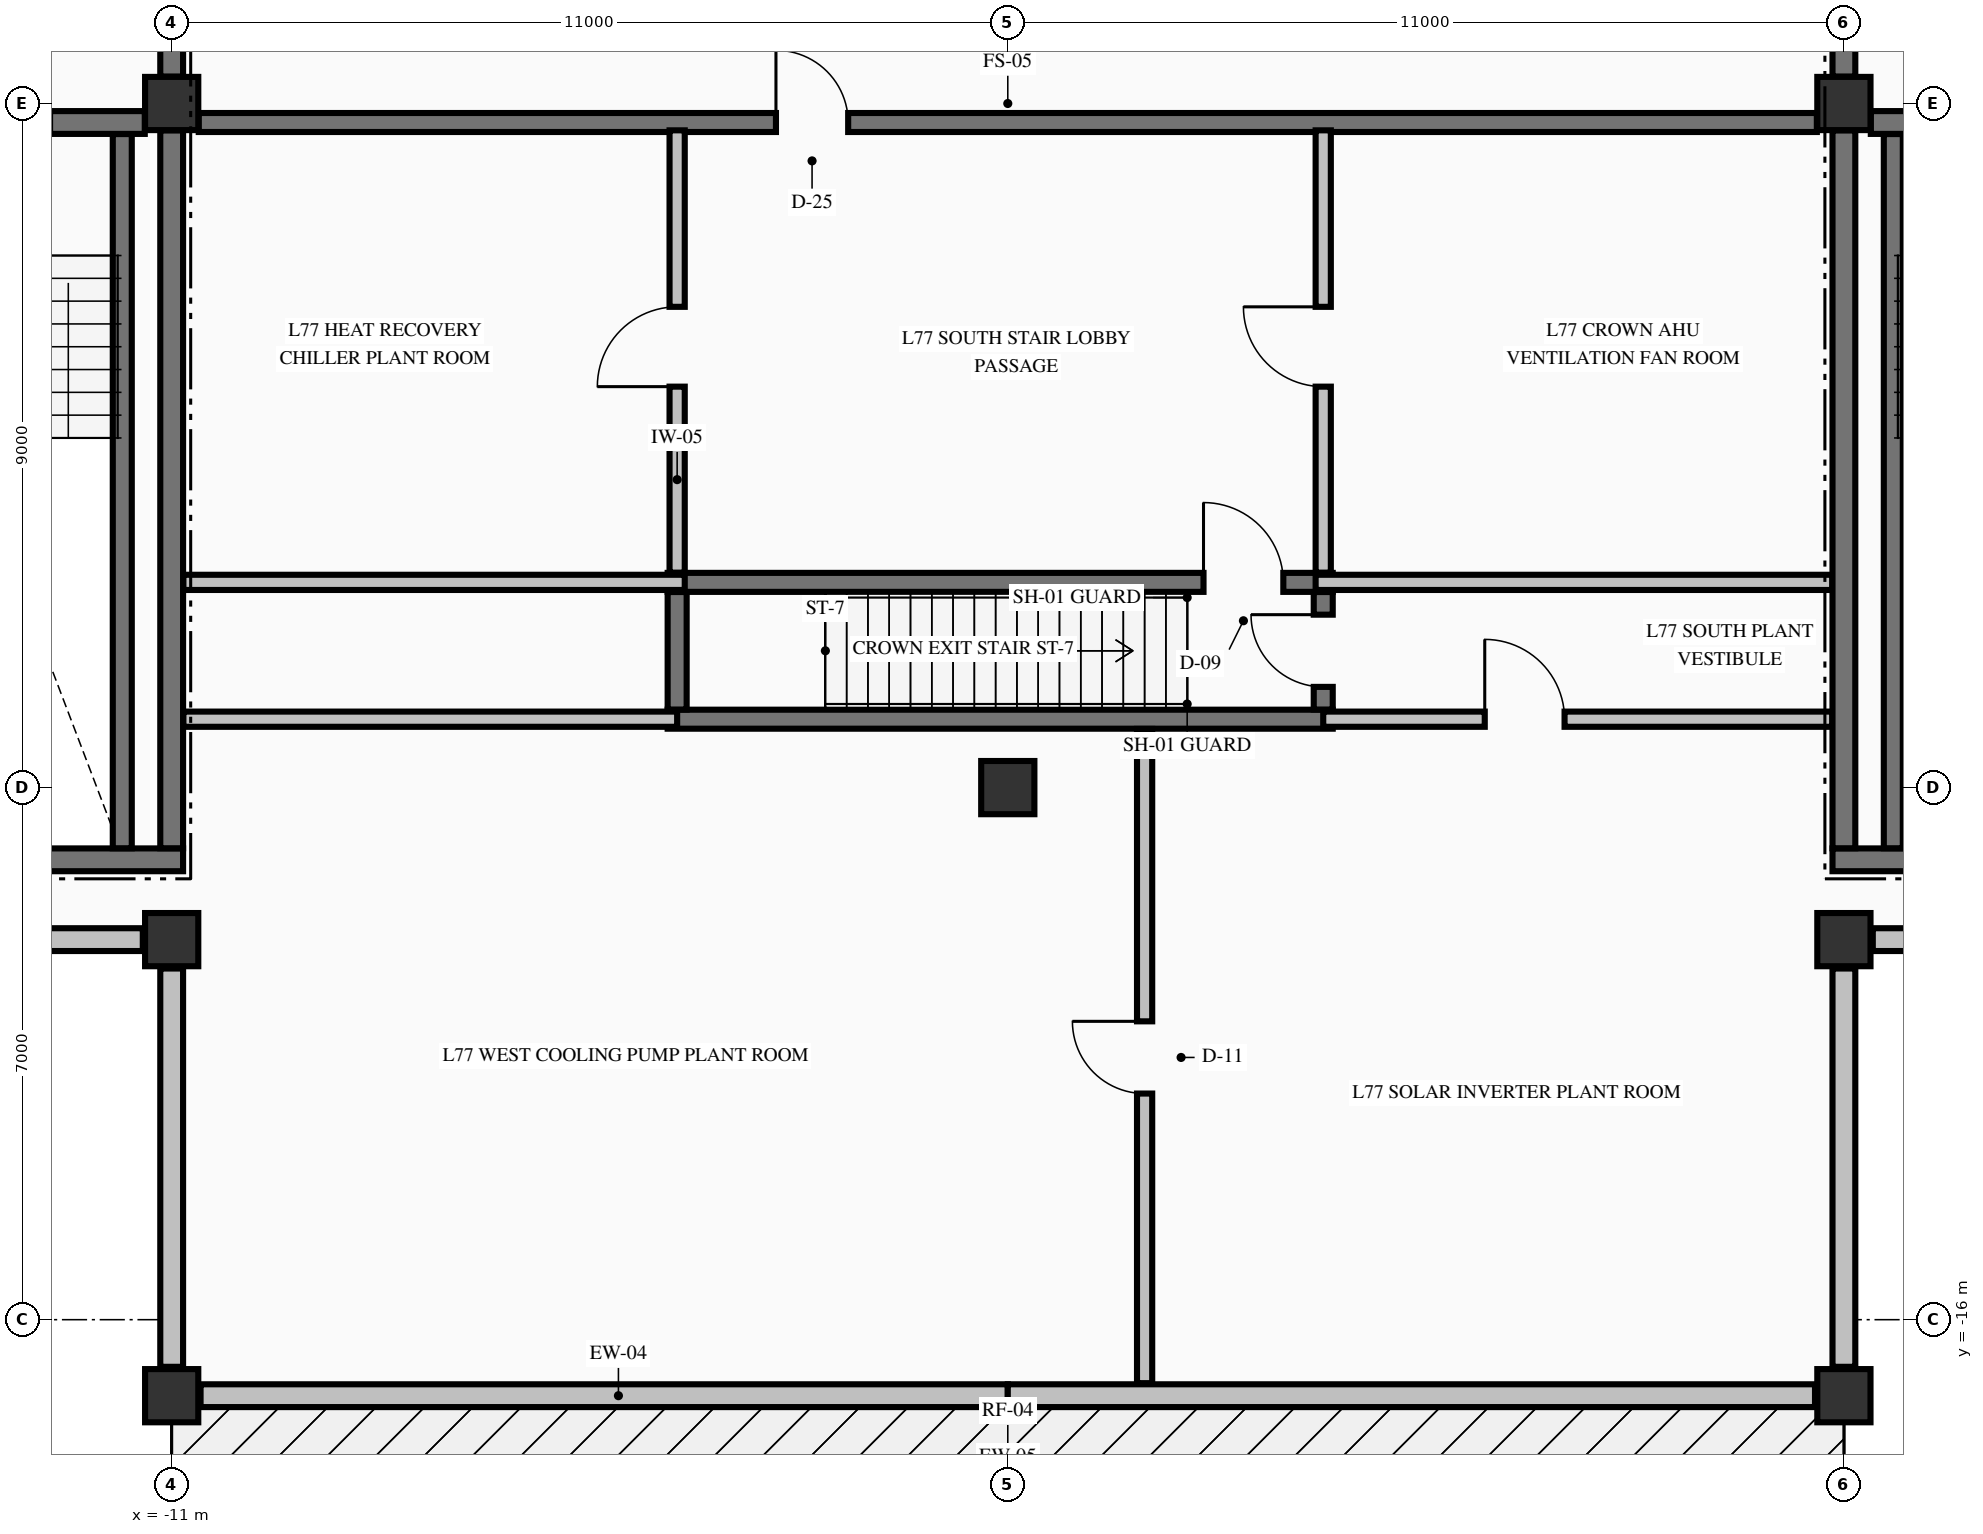
"""IFC4 building model, lengths in metres.
Left out: names, types, materials, properties, quantities, classifications, styles, units other than length and angle.
Written with IfcOpenShell. Run it as: python <this file> out.ifc"""

import sys

from ifc_helpers import new_model, si_unit, direction, frame, frame_2d, origin, origin_2d, place, context, subcontext, project, spatial, rectangle, extrude, element, fill, save


model = new_model("IFC4")
c1 = context("Model", 3, precision=1e-05, world=origin(), true_north=direction((0.0, 1.0)))
c2 = subcontext(c1, "Body", "Model", "MODEL_VIEW")
j1 = project(units=[si_unit("LENGTHUNIT", "METRE"), si_unit("PLANEANGLEUNIT", "RADIAN")], contexts=[c1])
p1 = place(None, origin())
s1 = spatial("IfcSite", under=j1, at=p1, CompositionType="ELEMENT")
p2 = place(p1, origin())
s2 = spatial("IfcBuilding", under=s1, at=p2, CompositionType="ELEMENT")
p3 = place(p2, frame((0.0, 0.0, 287.92)))
s3 = spatial("IfcBuildingStorey", under=s2, at=p3, CompositionType="ELEMENT", Elevation=287.92)
for number, where, z_axis, x_axis in (
    (1, (-11.0, -17.0, -0.325), (0.0, 0.0, 1.0), (1.0, 0.0, 0.0)),
    (2, (11.0, -17.0, -0.325), (0.0, 0.0, 1.0), (1.0, 0.0, 0.0)),
    (3, (-11.0, -11.0, -0.325), (0.0, 0.0, 1.0), (1.0, 0.0, 0.0)),
    (4, (11.0, -11.0, -0.325), (0.0, 0.0, 1.0), (1.0, 0.0, 0.0)),
    (5, (-11.0, 0.0, -0.325), (0.0, 0.0, 1.0), (1.0, 0.0, 0.0)),
    (6, (11.0, 0.0, -0.325), (0.0, 0.0, 1.0), (1.0, 0.0, 0.0)),
    (7, (0.0, -9.0, -0.325), (0.0, 0.0, 1.0), (1.0, 0.0, 0.0)),
):
    element("IfcColumn", number, at=place(p3, frame(where, z_axis=z_axis, x_axis=x_axis)), inside=s3, PredefinedType="COLUMN", context=c2, shape_type="SweptSolid", body=[
        extrude(rectangle(XDim=0.7, YDim=0.7, at=origin_2d()), origin(), (0.0, 0.0, 1.0), 3.06),
    ])
for number, where, z_axis, x_axis in (
    (8, (-10.62, -17.0, 0.0), (0.0, 0.0, 1.0), (1.0, 0.0, 0.0)),
    (9, (0.0, -17.0, 0.0), (0.0, 0.0, 1.0), (1.0, 0.0, 0.0)),
):
    element("IfcWall", number, at=place(p3, frame(where, z_axis=z_axis, x_axis=x_axis)), inside=s3, PredefinedType="STANDARD", context=c2, shape_type="SweptSolid", body=[
        extrude(rectangle(XDim=10.62, YDim=0.3, at=frame_2d((5.31, 0.0))), origin(), (0.0, 0.0, 1.0), 2.127),
    ])
p4 = place(p3, frame((11.0, -16.62, 0.0), z_axis=(0.0, 0.0, 1.0), x_axis=(0.0, 1.0, 0.0)))
e10 = element("IfcWall", 10, at=p4, inside=s3, PredefinedType="STANDARD", context=c2, shape_type="SweptSolid", body=[
    extrude(rectangle(XDim=5.24, YDim=0.3, at=frame_2d((2.62, 0.0))), origin(), (0.0, 0.0, 1.0), 0.927),
])
for number, where, z_axis, x_axis in (
    (11, (11.38, -11.0, 0.0), (0.0, 0.0, 1.0), (1.0, 0.0, 0.0)),
    (12, (-16.62, -11.0, 0.0), (0.0, 0.0, 1.0), (1.0, 0.0, 0.0)),
):
    element("IfcWall", number, at=place(p3, frame(where, z_axis=z_axis, x_axis=x_axis)), inside=s3, PredefinedType="STANDARD", context=c2, shape_type="SweptSolid", body=[
        extrude(rectangle(XDim=5.24, YDim=0.3, at=frame_2d((2.62, 0.0))), origin(), (0.0, 0.0, 1.0), 1.077),
    ])
p5 = place(p3, frame((-11.0, -11.38, 0.0), z_axis=(0.0, 0.0, 1.0), x_axis=(0.0, -1.0, 0.0)))
e13 = element("IfcWall", 13, at=p5, inside=s3, PredefinedType="STANDARD", context=c2, shape_type="SweptSolid", body=[
    extrude(rectangle(XDim=5.24, YDim=0.3, at=frame_2d((2.62, 0.0))), origin(), (0.0, 0.0, 1.0), 0.927),
])
for number, where, z_axis, x_axis in (
    (14, (-14.85, -9.95, 0.0), (0.0, 0.0, 1.0), (1.0, 0.0, 0.0)),
    (15, (10.85, -9.95, 0.0), (0.0, 0.0, 1.0), (1.0, 0.0, 0.0)),
):
    element("IfcWall", number, at=place(p3, frame(where, z_axis=z_axis, x_axis=x_axis)), inside=s3, PredefinedType="SHEAR", context=c2, shape_type="SweptSolid", body=[
        extrude(rectangle(XDim=4.0, YDim=0.3, at=frame_2d((2.0, 0.0))), origin(), (0.0, 0.0, 1.0), 2.735),
    ])
p6 = place(p3, frame((-4.475, -8.1, 0.0), z_axis=(0.0, 0.0, 1.0), x_axis=(1.0, 0.0, 0.0)))
e16 = element("IfcWall", 16, at=p6, inside=s3, PredefinedType="SOLIDWALL", context=c2, shape_type="SweptSolid", body=[
    extrude(rectangle(XDim=8.75, YDim=0.25, at=frame_2d((4.375, 0.0))), origin(), (0.0, 0.0, 1.0), 2.735),
])
p7 = place(p3, frame((-4.475, -6.3, 0.0), z_axis=(0.0, 0.0, 1.0), x_axis=(1.0, 0.0, 0.0)))
e17 = element("IfcWall", 17, at=p7, inside=s3, PredefinedType="SOLIDWALL", context=c2, shape_type="SweptSolid", body=[
    extrude(rectangle(XDim=8.75, YDim=0.25, at=frame_2d((4.375, 0.0))), origin(), (0.0, 0.0, 1.0), 2.735),
])
p8 = place(p7, frame((7.05, 0.0, 0.0)))
e18 = element("IfcOpeningElement", 18, at=p8, cuts=e17, PredefinedType="OPENING", context=c2, shape_type="SweptSolid", body=[
    extrude(rectangle(XDim=1.05, YDim=2.15, at=frame_2d((0.525, 1.075))), frame((0.0, 0.135, 0.0), z_axis=(0.0, -1.0, 0.0), x_axis=(1.0, 0.0, 0.0)), (0.0, 0.0, 1.0), 0.27),
])
p9 = place(p3, frame((-14.85, -0.25, 0.0), z_axis=(0.0, 0.0, 1.0), x_axis=(1.0, 0.0, 0.0)))
e19 = element("IfcWall", 19, at=p9, inside=s3, PredefinedType="SHEAR", context=c2, shape_type="SweptSolid", body=[
    extrude(rectangle(XDim=3.496, YDim=0.3, at=frame_2d((1.748, 0.0))), origin(), (0.0, 0.0, 1.0), 2.735),
])
p10 = place(p9, frame((1.15, 0.0, 0.0)))
e20 = element("IfcOpeningElement", 20, at=p10, cuts=e19, PredefinedType="OPENING", context=c2, shape_type="SweptSolid", body=[
    extrude(rectangle(XDim=1.1, YDim=2.15, at=frame_2d((0.55, 1.075))), frame((0.0, 0.16, 0.0), z_axis=(0.0, -1.0, 0.0), x_axis=(1.0, 0.0, 0.0)), (0.0, 0.0, 1.0), 0.32),
])
p11 = place(p3, frame((11.354, -0.25, 0.0), z_axis=(0.0, 0.0, 1.0), x_axis=(1.0, 0.0, 0.0)))
e21 = element("IfcWall", 21, at=p11, inside=s3, PredefinedType="SHEAR", context=c2, shape_type="SweptSolid", body=[
    extrude(rectangle(XDim=3.496, YDim=0.3, at=frame_2d((1.748, 0.0))), origin(), (0.0, 0.0, 1.0), 2.735),
])
p12 = place(p11, frame((1.246, 0.0, 0.0)))
e22 = element("IfcOpeningElement", 22, at=p12, cuts=e21, PredefinedType="OPENING", context=c2, shape_type="SweptSolid", body=[
    extrude(rectangle(XDim=1.1, YDim=2.15, at=frame_2d((0.55, 1.075))), frame((0.0, 0.16, 0.0), z_axis=(0.0, -1.0, 0.0), x_axis=(1.0, 0.0, 0.0)), (0.0, 0.0, 1.0), 0.32),
])
p13 = place(p3, frame((-10.847, -8.1, 0.0), z_axis=(0.0, 0.0, 1.0), x_axis=(1.0, 0.0, 0.0)))
e23 = element("IfcWall", 23, at=p13, inside=s3, PredefinedType="PARTITIONING", context=c2, shape_type="SweptSolid", body=[
    extrude(rectangle(XDim=6.497, YDim=0.2, at=frame_2d((3.249, 0.0))), origin(), (0.0, 0.0, 1.0), 2.735),
])
p14 = place(p3, frame((4.15, -8.1, 0.0), z_axis=(0.0, 0.0, 1.0), x_axis=(1.0, 0.0, 0.0)))
e24 = element("IfcWall", 24, at=p14, inside=s3, PredefinedType="PARTITIONING", context=c2, shape_type="SweptSolid", body=[
    extrude(rectangle(XDim=6.697, YDim=0.2, at=frame_2d((3.349, 0.0))), origin(), (0.0, 0.0, 1.0), 2.735),
])
p15 = place(p14, frame((2.125, 0.0, 0.0)))
e25 = element("IfcOpeningElement", 25, at=p15, cuts=e24, PredefinedType="OPENING", context=c2, shape_type="SweptSolid", body=[
    extrude(rectangle(XDim=1.05, YDim=2.15, at=frame_2d((0.525, 1.075))), frame((0.0, 0.11, 0.0), z_axis=(0.0, -1.0, 0.0), x_axis=(1.0, 0.0, 0.0)), (0.0, 0.0, 1.0), 0.22),
])
p16 = place(p3, frame((-10.847, -6.3, 0.0), z_axis=(0.0, 0.0, 1.0), x_axis=(1.0, 0.0, 0.0)))
e26 = element("IfcWall", 26, at=p16, inside=s3, PredefinedType="PARTITIONING", context=c2, shape_type="SweptSolid", body=[
    extrude(rectangle(XDim=6.597, YDim=0.2, at=frame_2d((3.298, 0.0))), origin(), (0.0, 0.0, 1.0), 2.735),
])
p17 = place(p3, frame((4.05, -6.3, 0.0), z_axis=(0.0, 0.0, 1.0), x_axis=(1.0, 0.0, 0.0)))
e27 = element("IfcWall", 27, at=p17, inside=s3, PredefinedType="PARTITIONING", context=c2, shape_type="SweptSolid", body=[
    extrude(rectangle(XDim=6.797, YDim=0.2, at=frame_2d((3.398, 0.0))), origin(), (0.0, 0.0, 1.0), 2.735),
])
p18 = place(p3, frame((-10.644, -0.25, 0.0), z_axis=(0.0, 0.0, 1.0), x_axis=(1.0, 0.0, 0.0)))
e28 = element("IfcWall", 28, at=p18, inside=s3, PredefinedType="SOLIDWALL", context=c2, shape_type="SweptSolid", body=[
    extrude(rectangle(XDim=21.288, YDim=0.25, at=frame_2d((10.644, 0.0))), origin(), (0.0, 0.0, 1.0), 2.735),
])
p19 = place(p18, frame((7.594, 0.0, 0.0)))
e29 = element("IfcOpeningElement", 29, at=p19, cuts=e28, PredefinedType="OPENING", context=c2, shape_type="SweptSolid", body=[
    extrude(rectangle(XDim=0.95, YDim=2.02, at=frame_2d((0.475, 1.01))), frame((0.0, 0.135, 0.0), z_axis=(0.0, -1.0, 0.0), x_axis=(1.0, 0.0, 0.0)), (0.0, 0.0, 1.0), 0.27),
])
p20 = place(p3, frame((-11.65, -9.798, 0.0), z_axis=(0.0, 0.0, 1.0), x_axis=(0.0, 1.0, 0.0)))
e30 = element("IfcWall", 30, at=p20, inside=s3, PredefinedType="SOLIDWALL", context=c2, shape_type="SweptSolid", body=[
    extrude(rectangle(XDim=9.396, YDim=0.25, at=frame_2d((4.698, 0.0))), origin(), (0.0, 0.0, 1.0), 2.735),
])
p21 = place(p3, frame((-11.0, -9.798, 0.0), z_axis=(0.0, 0.0, 1.0), x_axis=(0.0, 1.0, 0.0)))
e31 = element("IfcWall", 31, at=p21, inside=s3, PredefinedType="SHEAR", context=c2, shape_type="SweptSolid", body=[
    extrude(rectangle(XDim=9.444, YDim=0.3, at=frame_2d((4.722, 0.0))), origin(), (0.0, 0.0, 1.0), 2.735),
])
p22 = place(p3, frame((-11.0, 0.354, 0.0), z_axis=(0.0, 0.0, 1.0), x_axis=(0.0, 1.0, 0.0)))
e32 = element("IfcWall", 32, at=p22, inside=s3, PredefinedType="SHEAR", context=c2, shape_type="SweptSolid", body=[
    extrude(rectangle(XDim=2.394, YDim=0.3, at=frame_2d((1.197, 0.0))), origin(), (0.0, 0.0, 1.0), 2.735),
])
p23 = place(p22, frame((0.746, 0.0, 0.0)))
e33 = element("IfcOpeningElement", 33, at=p23, cuts=e32, PredefinedType="OPENING", context=c2, shape_type="SweptSolid", body=[
    extrude(rectangle(XDim=1.1, YDim=2.15, at=frame_2d((0.55, 1.075))), frame((0.0, 0.16, 0.0), z_axis=(0.0, -1.0, 0.0), x_axis=(1.0, 0.0, 0.0)), (0.0, 0.0, 1.0), 0.32),
])
p24 = place(p3, frame((-4.35, -7.973, 0.0), z_axis=(0.0, 0.0, 1.0), x_axis=(0.0, 1.0, 0.0)))
e34 = element("IfcWall", 34, at=p24, inside=s3, PredefinedType="SOLIDWALL", context=c2, shape_type="SweptSolid", body=[
    extrude(rectangle(XDim=1.546, YDim=0.25, at=frame_2d((0.773, 0.0))), origin(), (0.0, 0.0, 1.0), 2.735),
])
p25 = place(p3, frame((4.15, -7.973, 0.0), z_axis=(0.0, 0.0, 1.0), x_axis=(0.0, 1.0, 0.0)))
e35 = element("IfcWall", 35, at=p25, inside=s3, PredefinedType="SOLIDWALL", context=c2, shape_type="SweptSolid", body=[
    extrude(rectangle(XDim=1.546, YDim=0.25, at=frame_2d((0.773, 0.0))), origin(), (0.0, 0.0, 1.0), 2.735),
])
p26 = place(p25, frame((0.298, 0.0, 0.0)))
e36 = element("IfcOpeningElement", 36, at=p26, cuts=e35, PredefinedType="OPENING", context=c2, shape_type="SweptSolid", body=[
    extrude(rectangle(XDim=0.95, YDim=2.15, at=frame_2d((0.475, 1.075))), frame((0.0, 0.135, 0.0), z_axis=(0.0, -1.0, 0.0), x_axis=(1.0, 0.0, 0.0)), (0.0, 0.0, 1.0), 0.27),
])
p27 = place(p3, frame((11.0, -9.798, 0.0), z_axis=(0.0, 0.0, 1.0), x_axis=(0.0, 1.0, 0.0)))
e37 = element("IfcWall", 37, at=p27, inside=s3, PredefinedType="SHEAR", context=c2, shape_type="SweptSolid", body=[
    extrude(rectangle(XDim=9.444, YDim=0.3, at=frame_2d((4.722, 0.0))), origin(), (0.0, 0.0, 1.0), 2.735),
])
p28 = place(p3, frame((11.0, 0.354, 0.0), z_axis=(0.0, 0.0, 1.0), x_axis=(0.0, 1.0, 0.0)))
e38 = element("IfcWall", 38, at=p28, inside=s3, PredefinedType="SHEAR", context=c2, shape_type="SweptSolid", body=[
    extrude(rectangle(XDim=2.394, YDim=0.3, at=frame_2d((1.197, 0.0))), origin(), (0.0, 0.0, 1.0), 2.735),
])
p29 = place(p28, frame((0.746, 0.0, 0.0)))
e39 = element("IfcOpeningElement", 39, at=p29, cuts=e38, PredefinedType="OPENING", context=c2, shape_type="SweptSolid", body=[
    extrude(rectangle(XDim=1.1, YDim=2.15, at=frame_2d((0.55, 1.075))), frame((0.0, 0.16, 0.0), z_axis=(0.0, -1.0, 0.0), x_axis=(1.0, 0.0, 0.0)), (0.0, 0.0, 1.0), 0.32),
])
p30 = place(p3, frame((11.65, -9.798, 0.0), z_axis=(0.0, 0.0, 1.0), x_axis=(0.0, 1.0, 0.0)))
e40 = element("IfcWall", 40, at=p30, inside=s3, PredefinedType="SOLIDWALL", context=c2, shape_type="SweptSolid", body=[
    extrude(rectangle(XDim=9.396, YDim=0.25, at=frame_2d((4.698, 0.0))), origin(), (0.0, 0.0, 1.0), 2.735),
])
p31 = place(p3, frame((-4.35, -6.172, 0.0), z_axis=(0.0, 0.0, 1.0), x_axis=(0.0, 1.0, 0.0)))
e41 = element("IfcWall", 41, at=p31, inside=s3, PredefinedType="PARTITIONING", context=c2, shape_type="SweptSolid", body=[
    extrude(rectangle(XDim=5.819, YDim=0.2, at=frame_2d((2.91, 0.0))), origin(), (0.0, 0.0, 1.0), 2.735),
])
p32 = place(p31, frame((2.447, 0.0, 0.0)))
e42 = element("IfcOpeningElement", 42, at=p32, cuts=e41, PredefinedType="OPENING", context=c2, shape_type="SweptSolid", body=[
    extrude(rectangle(XDim=1.05, YDim=2.15, at=frame_2d((0.525, 1.075))), frame((0.0, 0.11, 0.0), z_axis=(0.0, -1.0, 0.0), x_axis=(1.0, 0.0, 0.0)), (0.0, 0.0, 1.0), 0.22),
])
p33 = place(p3, frame((1.8, -16.835, 0.0), z_axis=(0.0, 0.0, 1.0), x_axis=(0.0, 1.0, 0.0)))
e43 = element("IfcWall", 43, at=p33, inside=s3, PredefinedType="PARTITIONING", context=c2, shape_type="SweptSolid", body=[
    extrude(rectangle(XDim=8.607, YDim=0.2, at=frame_2d((4.303, 0.0))), origin(), (0.0, 0.0, 1.0), 2.735),
])
p34 = place(p33, frame((3.81, 0.0, 0.0)))
e44 = element("IfcOpeningElement", 44, at=p34, cuts=e43, PredefinedType="OPENING", context=c2, shape_type="SweptSolid", body=[
    extrude(rectangle(XDim=0.95, YDim=2.15, at=frame_2d((0.475, 1.075))), frame((0.0, 0.11, 0.0), z_axis=(0.0, -1.0, 0.0), x_axis=(1.0, 0.0, 0.0)), (0.0, 0.0, 1.0), 0.22),
])
p35 = place(p3, frame((4.15, -6.172, 0.0), z_axis=(0.0, 0.0, 1.0), x_axis=(0.0, 1.0, 0.0)))
e45 = element("IfcWall", 45, at=p35, inside=s3, PredefinedType="PARTITIONING", context=c2, shape_type="SweptSolid", body=[
    extrude(rectangle(XDim=5.819, YDim=0.2, at=frame_2d((2.91, 0.0))), origin(), (0.0, 0.0, 1.0), 2.735),
])
p36 = place(p35, frame((2.447, 0.0, 0.0)))
e46 = element("IfcOpeningElement", 46, at=p36, cuts=e45, PredefinedType="OPENING", context=c2, shape_type="SweptSolid", body=[
    extrude(rectangle(XDim=1.05, YDim=2.15, at=frame_2d((0.525, 1.075))), frame((0.0, 0.11, 0.0), z_axis=(0.0, -1.0, 0.0), x_axis=(1.0, 0.0, 0.0)), (0.0, 0.0, 1.0), 0.22),
])
p37 = place(p8, origin())
e47 = element("IfcDoor", 47, at=p37, inside=s3, OperationType="SINGLE_SWING_LEFT", PredefinedType="DOOR", context=c2, shape_type="SweptSolid", body=[
    extrude(rectangle(XDim=1.05, YDim=2.15, at=frame_2d((0.525, 1.075))), frame((0.0, 0.025, 0.0), z_axis=(0.0, -1.0, 0.0), x_axis=(1.0, 0.0, 0.0)), (0.0, 0.0, 1.0), 0.05),
])
fill(e18, e47)
p38 = place(p19, origin())
e48 = element("IfcDoor", 48, at=p38, inside=s3, OperationType="SINGLE_SWING_LEFT", PredefinedType="DOOR", context=c2, shape_type="SweptSolid", body=[
    extrude(rectangle(XDim=0.95, YDim=2.02, at=frame_2d((0.475, 1.01))), frame((0.0, 0.025, 0.0), z_axis=(0.0, -1.0, 0.0), x_axis=(1.0, 0.0, 0.0)), (0.0, 0.0, 1.0), 0.05),
])
fill(e29, e48)
p39 = place(p32, origin())
e49 = element("IfcDoor", 49, at=p39, inside=s3, OperationType="SINGLE_SWING_LEFT", PredefinedType="DOOR", context=c2, shape_type="SweptSolid", body=[
    extrude(rectangle(XDim=1.05, YDim=2.15, at=frame_2d((0.525, 1.075))), frame((0.0, 0.025, 0.0), z_axis=(0.0, -1.0, 0.0), x_axis=(1.0, 0.0, 0.0)), (0.0, 0.0, 1.0), 0.05),
])
fill(e42, e49)
p40 = place(p36, origin())
e50 = element("IfcDoor", 50, at=p40, inside=s3, OperationType="SINGLE_SWING_RIGHT", PredefinedType="DOOR", context=c2, shape_type="SweptSolid", body=[
    extrude(rectangle(XDim=1.05, YDim=2.15, at=frame_2d((0.525, 1.075))), frame((0.0, 0.025, 0.0), z_axis=(0.0, -1.0, 0.0), x_axis=(1.0, 0.0, 0.0)), (0.0, 0.0, 1.0), 0.05),
])
fill(e46, e50)
p41 = place(p34, origin())
e51 = element("IfcDoor", 51, at=p41, inside=s3, OperationType="SINGLE_SWING_RIGHT", PredefinedType="DOOR", context=c2, shape_type="SweptSolid", body=[
    extrude(rectangle(XDim=0.95, YDim=2.15, at=frame_2d((0.475, 1.075))), frame((0.0, 0.025, 0.0), z_axis=(0.0, -1.0, 0.0), x_axis=(1.0, 0.0, 0.0)), (0.0, 0.0, 1.0), 0.05),
])
fill(e44, e51)
p42 = place(p26, origin())
e52 = element("IfcDoor", 52, at=p42, inside=s3, OperationType="SINGLE_SWING_RIGHT", PredefinedType="DOOR", context=c2, shape_type="SweptSolid", body=[
    extrude(rectangle(XDim=0.95, YDim=2.15, at=frame_2d((0.475, 1.075))), frame((0.0, 0.025, 0.0), z_axis=(0.0, -1.0, 0.0), x_axis=(1.0, 0.0, 0.0)), (0.0, 0.0, 1.0), 0.05),
])
fill(e36, e52)
p43 = place(p15, origin())
e53 = element("IfcDoor", 53, at=p43, inside=s3, OperationType="SINGLE_SWING_LEFT", PredefinedType="DOOR", context=c2, shape_type="SweptSolid", body=[
    extrude(rectangle(XDim=1.05, YDim=2.15, at=frame_2d((0.525, 1.075))), frame((0.0, 0.025, 0.0), z_axis=(0.0, -1.0, 0.0), x_axis=(1.0, 0.0, 0.0)), (0.0, 0.0, 1.0), 0.05),
])
fill(e25, e53)
save(model, sys.argv[1])
